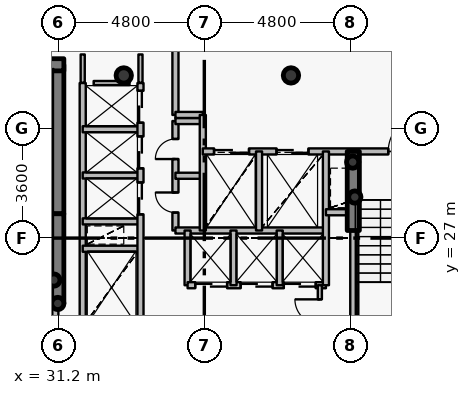
"""IFC4 building model, lengths in metres.
Left out: names, types, materials, properties, quantities, classifications, styles, units other than length and angle.
Written with IfcOpenShell. Run it as: python <this file> out.ifc"""

import sys

from ifc_helpers import new_model, si_unit, direction, frame, frame_2d, origin, origin_2d, place, context, subcontext, project, spatial, rectangle, hollow_circle, extrude, source, transform, mapped, element, fill, save


model = new_model("IFC4")
c1 = context("Model", 3, precision=1e-05, world=origin(), true_north=direction((0.0, 1.0)))
c2 = subcontext(c1, "Body", "Model", "MODEL_VIEW")
j1 = project(units=[si_unit("LENGTHUNIT", "METRE"), si_unit("PLANEANGLEUNIT", "RADIAN")], contexts=[c1])
p1 = place(None, origin())
s1 = spatial("IfcSite", under=j1, at=p1, CompositionType="ELEMENT")
p2 = place(p1, origin())
s2 = spatial("IfcBuilding", under=s1, at=p2, CompositionType="ELEMENT")
p3 = place(p2, origin())
s3 = spatial("IfcBuildingStorey", under=s2, at=p3, CompositionType="ELEMENT", Elevation=0.0)
for number, where, z_axis, x_axis in (
    (1, (38.85, 32.35, 0.0), (0.0, 0.0, 1.0), (1.0, 0.0, 0.0)),
    (2, (33.35, 32.35, 0.0), (0.0, 0.0, 1.0), (1.0, 0.0, 0.0)),
):
    element("IfcColumn", number, at=place(p3, frame(where, z_axis=z_axis, x_axis=x_axis)), inside=s3, PredefinedType="COLUMN", context=c2, shape_type="SweptSolid", body=[
        extrude(hollow_circle(Radius=0.254, WallThickness=0.02, at=origin_2d()), origin(), (0.0, 0.0, 1.0), 6.0),
    ])
p4 = place(p3, frame((31.18, 27.8, 0.0), z_axis=(0.0, 0.0, 1.0), x_axis=(0.0, 1.0, 0.0)))
e3 = element("IfcWall", 3, at=p4, inside=s3, PredefinedType="SHEAR", context=c2, shape_type="SweptSolid", body=[
    extrude(rectangle(XDim=4.9, YDim=0.4, at=frame_2d((2.45, 0.0))), origin(), (0.0, 0.0, 1.0), 6.0),
])
p5 = place(p3, frame((27.28, 32.7, 0.0), z_axis=(0.0, 0.0, 1.0), x_axis=(1.0, 0.0, 0.0)))
e4 = element("IfcWall", 4, at=p5, inside=s3, PredefinedType="SHEAR", context=c2, shape_type="SweptSolid", body=[
    extrude(rectangle(XDim=4.1, YDim=0.4, at=frame_2d((2.05, 0.0))), origin(), (0.0, 0.0, 1.0), 6.0),
])
for number, where, z_axis, x_axis in (
    (5, (31.05, 25.62, 0.0), (0.0, 0.0, 1.0), (1.0, 0.0, 0.0)),
    (6, (31.18, 24.85, 0.0), (0.0, 0.0, 1.0), (1.0, 0.0, 0.0)),
    (7, (40.95, 28.35, 0.0), (0.0, 0.0, 1.0), (1.0, 0.0, 0.0)),
    (8, (40.88, 29.5, 0.0), (0.0, 0.0, 1.0), (1.0, 0.0, 0.0)),
):
    element("IfcColumn", number, at=place(p3, frame(where, z_axis=z_axis, x_axis=x_axis)), inside=s3, PredefinedType="COLUMN", context=c2, shape_type="SweptSolid", body=[
        extrude(hollow_circle(Radius=0.203, WallThickness=0.016, at=origin_2d()), origin(), (0.0, 0.0, 1.0), 6.0),
    ])
p6 = place(p3, frame((31.18, 24.85, 0.0), z_axis=(0.0, 0.0, 1.0), x_axis=(0.0, 1.0, 0.0)))
e9 = element("IfcWall", 9, at=p6, inside=s3, PredefinedType="SHEAR", context=c2, shape_type="SweptSolid", body=[
    extrude(rectangle(XDim=2.95, YDim=0.4, at=frame_2d((1.475, 0.0))), origin(), (0.0, 0.0, 1.0), 5.3),
])
p7 = place(p3, frame((40.9, 27.25, 0.0), z_axis=(0.0, 0.0, 1.0), x_axis=(0.0, 1.0, 0.0)))
e10 = element("IfcWall", 10, at=p7, inside=s3, PredefinedType="SHEAR", context=c2, shape_type="SweptSolid", body=[
    extrude(rectangle(XDim=2.6, YDim=0.4, at=frame_2d((1.3, 0.0))), origin(), (0.0, 0.0, 1.0), 5.3),
])
p8 = place(p3, frame((31.1, 24.1, 0.0), z_axis=(0.0, 0.0, 1.0), x_axis=(0.0, 1.0, 0.0)))
e11 = element("IfcWall", 11, at=p8, inside=s3, PredefinedType="PARTITIONING", context=c2, shape_type="SweptSolid", body=[
    extrude(rectangle(XDim=0.74, YDim=0.2, at=frame_2d((0.37, 0.0))), origin(), (0.0, 0.0, 1.0), 5.7),
])
p9 = place(p3, frame((32.0, 24.1, 0.0), z_axis=(0.0, 0.0, 1.0), x_axis=(0.0, 1.0, 0.0)))
e12 = element("IfcWall", 12, at=p9, inside=s3, PredefinedType="PARTITIONING", context=c2, shape_type="SweptSolid", body=[
    extrude(rectangle(XDim=8.0, YDim=0.2, at=frame_2d((4.0, 0.0))), origin(), (0.0, 0.0, 1.0), 5.7),
])
for number, where, z_axis, x_axis in (
    (13, (32.0, 26.65, 0.0), (0.0, 0.0, 1.0), (1.0, 0.0, 0.0)),
    (14, (32.0, 27.55, 0.0), (0.0, 0.0, 1.0), (1.0, 0.0, 0.0)),
    (15, (32.0, 29.06, 0.0), (0.0, 0.0, 1.0), (1.0, 0.0, 0.0)),
    (16, (32.0, 30.58, 0.0), (0.0, 0.0, 1.0), (1.0, 0.0, 0.0)),
):
    element("IfcWall", number, at=place(p3, frame(where, z_axis=z_axis, x_axis=x_axis)), inside=s3, PredefinedType="PARTITIONING", context=c2, shape_type="SweptSolid", body=[
        extrude(rectangle(XDim=1.9, YDim=0.2, at=frame_2d((0.95, 0.0))), origin(), (0.0, 0.0, 1.0), 5.285),
    ])
p10 = place(p3, frame((33.9, 20.7, 0.0), z_axis=(0.0, 0.0, 1.0), x_axis=(0.0, 1.0, 0.0)))
e17 = element("IfcWall", 17, at=p10, inside=s3, PredefinedType="PARTITIONING", context=c2, shape_type="SweptSolid", body=[
    extrude(rectangle(XDim=11.4, YDim=0.2, at=frame_2d((5.7, 0.0))), origin(), (0.0, 0.0, 1.0), 5.285),
])
p11 = place(p10, frame((7.08, 0.0, 0.0)))
e18 = element("IfcOpeningElement", 18, at=p11, cuts=e17, PredefinedType="OPENING", context=c2, shape_type="SweptSolid", body=[
    extrude(rectangle(XDim=1.05, YDim=2.15, at=origin_2d()), frame((0.525, 0.11, 1.075), z_axis=(0.0, -1.0, 0.0), x_axis=(1.0, 0.0, 0.0)), (0.0, 0.0, 1.0), 0.22),
])
p12 = place(p10, frame((8.595, 0.0, 0.0)))
e19 = element("IfcOpeningElement", 19, at=p12, cuts=e17, PredefinedType="OPENING", context=c2, shape_type="SweptSolid", body=[
    extrude(rectangle(XDim=1.05, YDim=2.15, at=origin_2d()), frame((0.525, 0.11, 1.075), z_axis=(0.0, -1.0, 0.0), x_axis=(1.0, 0.0, 0.0)), (0.0, 0.0, 1.0), 0.22),
])
p13 = place(p10, frame((10.095, 0.0, 0.0)))
e20 = element("IfcOpeningElement", 20, at=p13, cuts=e17, PredefinedType="OPENING", context=c2, shape_type="SweptSolid", body=[
    extrude(rectangle(XDim=1.05, YDim=2.15, at=origin_2d()), frame((0.525, 0.11, 1.075), z_axis=(0.0, -1.0, 0.0), x_axis=(1.0, 0.0, 0.0)), (0.0, 0.0, 1.0), 0.22),
])
p14 = place(p3, frame((35.05, 27.25, 0.0), z_axis=(0.0, 0.0, 1.0), x_axis=(0.0, 1.0, 0.0)))
e21 = element("IfcWall", 21, at=p14, inside=s3, PredefinedType="PARTITIONING", context=c2, shape_type="SweptSolid", body=[
    extrude(rectangle(XDim=3.6, YDim=0.2, at=frame_2d((1.8, 0.0))), origin(), (0.0, 0.0, 1.0), 5.7),
])
p15 = place(p14, frame((0.59, 0.0, 0.0)))
e22 = element("IfcOpeningElement", 22, at=p15, cuts=e21, PredefinedType="OPENING", context=c2, shape_type="SweptSolid", body=[
    extrude(rectangle(XDim=0.66, YDim=2.05, at=origin_2d()), frame((0.33, 0.11, 1.025), z_axis=(0.0, -1.0, 0.0), x_axis=(1.0, 0.0, 0.0)), (0.0, 0.0, 1.0), 0.22),
])
p16 = place(p14, frame((2.35, 0.0, 0.0)))
e23 = element("IfcOpeningElement", 23, at=p16, cuts=e21, PredefinedType="OPENING", context=c2, shape_type="SweptSolid", body=[
    extrude(rectangle(XDim=0.66, YDim=2.05, at=origin_2d()), frame((0.33, 0.11, 1.025), z_axis=(0.0, -1.0, 0.0), x_axis=(1.0, 0.0, 0.0)), (0.0, 0.0, 1.0), 0.22),
])
p17 = place(p3, frame((35.05, 27.25, 0.0), z_axis=(0.0, 0.0, 1.0), x_axis=(1.0, 0.0, 0.0)))
e24 = element("IfcWall", 24, at=p17, inside=s3, PredefinedType="PARTITIONING", context=c2, shape_type="SweptSolid", body=[
    extrude(rectangle(XDim=4.95, YDim=0.2, at=frame_2d((2.475, 0.0))), origin(), (0.0, 0.0, 1.0), 5.285),
])
for number, where, z_axis, x_axis in (
    (25, (35.05, 29.05, 0.0), (0.0, 0.0, 1.0), (1.0, 0.0, 0.0)),
    (26, (35.05, 30.85, 0.0), (0.0, 0.0, 1.0), (1.0, 0.0, 0.0)),
):
    element("IfcWall", number, at=place(p3, frame(where, z_axis=z_axis, x_axis=x_axis)), inside=s3, PredefinedType="PARTITIONING", context=c2, shape_type="SweptSolid", body=[
        extrude(rectangle(XDim=0.9, YDim=0.2, at=frame_2d((0.45, 0.0))), origin(), (0.0, 0.0, 1.0), 5.7),
    ])
p18 = place(p3, frame((35.05, 31.05, 0.0), z_axis=(0.0, 0.0, 1.0), x_axis=(0.0, 1.0, 0.0)))
e27 = element("IfcWall", 27, at=p18, inside=s3, PredefinedType="PARTITIONING", context=c2, shape_type="SweptSolid", body=[
    extrude(rectangle(XDim=2.25, YDim=0.2, at=frame_2d((1.125, 0.0))), origin(), (0.0, 0.0, 1.0), 5.285),
])
p19 = place(p3, frame((35.05, 31.05, 0.0), z_axis=(0.0, 0.0, 1.0), x_axis=(1.0, 0.0, 0.0)))
e28 = element("IfcWall", 28, at=p19, inside=s3, PredefinedType="PARTITIONING", context=c2, shape_type="SweptSolid", body=[
    extrude(rectangle(XDim=0.9, YDim=0.2, at=frame_2d((0.45, 0.0))), origin(), (0.0, 0.0, 1.0), 5.7),
])
p20 = place(p3, frame((35.45, 25.45, 0.0), z_axis=(0.0, 0.0, 1.0), x_axis=(0.0, 1.0, 0.0)))
e29 = element("IfcWall", 29, at=p20, inside=s3, PredefinedType="PARTITIONING", context=c2, shape_type="SweptSolid", body=[
    extrude(rectangle(XDim=1.8, YDim=0.2, at=frame_2d((0.9, 0.0))), origin(), (0.0, 0.0, 1.0), 5.7),
])
p21 = place(p3, frame((35.45, 25.45, 0.0), z_axis=(0.0, 0.0, 1.0), x_axis=(1.0, 0.0, 0.0)))
e30 = element("IfcWall", 30, at=p21, inside=s3, PredefinedType="PARTITIONING", context=c2, shape_type="SweptSolid", body=[
    extrude(rectangle(XDim=4.55, YDim=0.2, at=frame_2d((2.275, 0.0))), origin(), (0.0, 0.0, 1.0), 5.285),
])
p22 = place(p21, frame((0.25, 0.0, 0.0)))
e31 = element("IfcOpeningElement", 31, at=p22, cuts=e30, PredefinedType="OPENING", context=c2, shape_type="SweptSolid", body=[
    extrude(rectangle(XDim=1.05, YDim=2.15, at=origin_2d()), frame((0.525, 0.11, 1.075), z_axis=(0.0, -1.0, 0.0), x_axis=(1.0, 0.0, 0.0)), (0.0, 0.0, 1.0), 0.22),
])
p23 = place(p21, frame((1.745, 0.0, 0.0)))
e32 = element("IfcOpeningElement", 32, at=p23, cuts=e30, PredefinedType="OPENING", context=c2, shape_type="SweptSolid", body=[
    extrude(rectangle(XDim=1.05, YDim=2.15, at=origin_2d()), frame((0.525, 0.11, 1.075), z_axis=(0.0, -1.0, 0.0), x_axis=(1.0, 0.0, 0.0)), (0.0, 0.0, 1.0), 0.22),
])
p24 = place(p21, frame((3.165, 0.0, 0.0)))
e33 = element("IfcOpeningElement", 33, at=p24, cuts=e30, PredefinedType="OPENING", context=c2, shape_type="SweptSolid", body=[
    extrude(rectangle(XDim=1.05, YDim=2.15, at=origin_2d()), frame((0.525, 0.11, 1.075), z_axis=(0.0, -1.0, 0.0), x_axis=(1.0, 0.0, 0.0)), (0.0, 0.0, 1.0), 0.22),
])
p25 = place(p3, frame((35.95, 27.25, 0.0), z_axis=(0.0, 0.0, 1.0), x_axis=(0.0, 1.0, 0.0)))
e34 = element("IfcWall", 34, at=p25, inside=s3, PredefinedType="PARTITIONING", context=c2, shape_type="SweptSolid", body=[
    extrude(rectangle(XDim=3.8, YDim=0.2, at=frame_2d((1.9, 0.0))), origin(), (0.0, 0.0, 1.0), 5.7),
])
p26 = place(p3, frame((35.95, 29.85, 0.0), z_axis=(0.0, 0.0, 1.0), x_axis=(1.0, 0.0, 0.0)))
e35 = element("IfcWall", 35, at=p26, inside=s3, PredefinedType="PARTITIONING", context=c2, shape_type="SweptSolid", body=[
    extrude(rectangle(XDim=8.49, YDim=0.2, at=frame_2d((4.245, 0.0))), origin(), (0.0, 0.0, 1.0), 5.285),
])
p27 = place(p26, frame((6.1, 0.0, 0.0)))
e36 = element("IfcOpeningElement", 36, at=p27, cuts=e35, PredefinedType="OPENING", context=c2, shape_type="SweptSolid", body=[
    extrude(rectangle(XDim=1.2, YDim=2.15, at=origin_2d()), frame((0.6, 0.11, 1.075), z_axis=(0.0, -1.0, 0.0), x_axis=(1.0, 0.0, 0.0)), (0.0, 0.0, 1.0), 0.22),
])
p28 = place(p26, frame((0.37, 0.0, 0.0)))
e37 = element("IfcOpeningElement", 37, at=p28, cuts=e35, PredefinedType="OPENING", context=c2, shape_type="SweptSolid", body=[
    extrude(rectangle(XDim=1.15, YDim=2.15, at=origin_2d()), frame((0.575, 0.11, 1.075), z_axis=(0.0, -1.0, 0.0), x_axis=(1.0, 0.0, 0.0)), (0.0, 0.0, 1.0), 0.22),
])
p29 = place(p26, frame((2.425, 0.0, 0.0)))
e38 = element("IfcOpeningElement", 38, at=p29, cuts=e35, PredefinedType="OPENING", context=c2, shape_type="SweptSolid", body=[
    extrude(rectangle(XDim=1.05, YDim=2.15, at=origin_2d()), frame((0.525, 0.11, 1.075), z_axis=(0.0, -1.0, 0.0), x_axis=(1.0, 0.0, 0.0)), (0.0, 0.0, 1.0), 0.22),
])
p30 = place(p3, frame((36.96, 25.45, 0.0), z_axis=(0.0, 0.0, 1.0), x_axis=(0.0, 1.0, 0.0)))
e39 = element("IfcWall", 39, at=p30, inside=s3, PredefinedType="PARTITIONING", context=c2, shape_type="SweptSolid", body=[
    extrude(rectangle(XDim=1.8, YDim=0.2, at=frame_2d((0.9, 0.0))), origin(), (0.0, 0.0, 1.0), 5.7),
])
p31 = place(p3, frame((37.8, 27.25, 0.0), z_axis=(0.0, 0.0, 1.0), x_axis=(0.0, 1.0, 0.0)))
e40 = element("IfcWall", 40, at=p31, inside=s3, PredefinedType="PARTITIONING", context=c2, shape_type="SweptSolid", body=[
    extrude(rectangle(XDim=2.6, YDim=0.2, at=frame_2d((1.3, 0.0))), origin(), (0.0, 0.0, 1.0), 5.7),
])
p32 = place(p3, frame((38.48, 25.45, 0.0), z_axis=(0.0, 0.0, 1.0), x_axis=(0.0, 1.0, 0.0)))
e41 = element("IfcWall", 41, at=p32, inside=s3, PredefinedType="PARTITIONING", context=c2, shape_type="SweptSolid", body=[
    extrude(rectangle(XDim=1.8, YDim=0.2, at=frame_2d((0.9, 0.0))), origin(), (0.0, 0.0, 1.0), 5.7),
])
p33 = place(p3, frame((39.8, 23.7, 0.0), z_axis=(0.0, 0.0, 1.0), x_axis=(0.0, 1.0, 0.0)))
e42 = element("IfcWall", 42, at=p33, inside=s3, PredefinedType="PARTITIONING", context=c2, shape_type="SweptSolid", body=[
    extrude(rectangle(XDim=1.75, YDim=0.135, at=frame_2d((0.875, 0.0))), origin(), (0.0, 0.0, 1.0), 5.7),
])
p34 = place(p33, frame((0.465, 0.0, 0.0)))
e43 = element("IfcOpeningElement", 43, at=p34, cuts=e42, PredefinedType="OPENING", context=c2, shape_type="SweptSolid", body=[
    extrude(rectangle(XDim=0.82, YDim=2.1, at=origin_2d()), frame((0.41, 0.078, 1.05), z_axis=(0.0, -1.0, 0.0), x_axis=(1.0, 0.0, 0.0)), (0.0, 0.0, 1.0), 0.155),
])
p35 = place(p3, frame((40.0, 25.45, 0.0), z_axis=(0.0, 0.0, 1.0), x_axis=(0.0, 1.0, 0.0)))
e44 = element("IfcWall", 44, at=p35, inside=s3, PredefinedType="PARTITIONING", context=c2, shape_type="SweptSolid", body=[
    extrude(rectangle(XDim=4.4, YDim=0.2, at=frame_2d((2.2, 0.0))), origin(), (0.0, 0.0, 1.0), 5.7),
])
p36 = place(p3, frame((40.0, 27.85, 0.0), z_axis=(0.0, 0.0, 1.0), x_axis=(1.0, 0.0, 0.0)))
e45 = element("IfcWall", 45, at=p36, inside=s3, PredefinedType="PARTITIONING", context=c2, shape_type="SweptSolid", body=[
    extrude(rectangle(XDim=0.9, YDim=0.2, at=frame_2d((0.45, 0.0))), origin(), (0.0, 0.0, 1.0), 5.7),
])
p37 = place(p3, frame((40.9, 21.33, 0.0), z_axis=(0.0, 0.0, 1.0), x_axis=(0.0, 1.0, 0.0)))
e46 = element("IfcWall", 46, at=p37, inside=s3, PredefinedType="PARTITIONING", context=c2, shape_type="SweptSolid", body=[
    extrude(rectangle(XDim=5.91, YDim=0.2, at=frame_2d((2.955, 0.0))), origin(), (0.0, 0.0, 1.0), 5.235),
])
p38 = place(p3, frame((32.36, 32.1, 0.0), z_axis=(0.0, 0.0, 1.0), x_axis=(1.0, 0.0, 0.0)))
e47 = element("IfcWall", 47, at=p38, inside=s3, PredefinedType="PARTITIONING", context=c2, shape_type="SweptSolid", body=[
    extrude(rectangle(XDim=1.18, YDim=0.135, at=frame_2d((0.59, 0.0))), origin(), (0.0, 0.0, 1.0), 5.285),
])
p39 = place(p3, frame((32.0, 33.04, 0.0), z_axis=(0.0, 0.0, 1.0), x_axis=(0.0, -1.0, 0.0)))
e48 = element("IfcWall", 48, at=p39, inside=s3, PredefinedType="PARTITIONING", context=c2, shape_type="SweptSolid", body=[
    extrude(rectangle(XDim=0.93, YDim=0.135, at=frame_2d((0.465, 0.0))), origin(), (0.0, 0.0, 1.0), 5.235),
])
p40 = place(p3, frame((33.9, 32.11, 0.0), z_axis=(0.0, 0.0, 1.0), x_axis=(0.0, 1.0, 0.0)))
e49 = element("IfcWall", 49, at=p40, inside=s3, PredefinedType="PARTITIONING", context=c2, shape_type="SweptSolid", body=[
    extrude(rectangle(XDim=0.93, YDim=0.135, at=frame_2d((0.465, 0.0))), origin(), (0.0, 0.0, 1.0), 5.285),
])
m1 = source(origin(), c2, "Body", "SweptSolid", [
    extrude(rectangle(XDim=1.2, YDim=2.15, at=origin_2d()), frame((0.6, 0.025, 1.075), z_axis=(0.0, -1.0, 0.0), x_axis=(1.0, 0.0, 0.0)), (0.0, 0.0, 1.0), 0.05),
])
p41 = place(p27, origin())
e50 = element("IfcDoor", 50, at=p41, inside=s3, OperationType="SINGLE_SWING_RIGHT", PredefinedType="DOOR", context=c2, shape_type="MappedRepresentation", body=[
    mapped(m1, transform((0.0, 0.0, 0.0), x_axis=(1.0, 0.0, 0.0), y_axis=(0.0, 1.0, 0.0), z_axis=(0.0, 0.0, 1.0), scale=1.0)),
])
fill(e36, e50)
m2 = source(origin(), c2, "Body", "SweptSolid", [
    extrude(rectangle(XDim=1.15, YDim=2.15, at=origin_2d()), frame((0.575, 0.025, 1.075), z_axis=(0.0, -1.0, 0.0), x_axis=(1.0, 0.0, 0.0)), (0.0, 0.0, 1.0), 0.05),
])
p42 = place(p28, origin())
e51 = element("IfcDoor", 51, at=p42, inside=s3, OperationType="DOUBLE_DOOR_SLIDING", PredefinedType="USERDEFINED", context=c2, shape_type="MappedRepresentation", body=[
    mapped(m2, transform((0.0, 0.0, 0.0), x_axis=(1.0, 0.0, 0.0), y_axis=(0.0, 1.0, 0.0), z_axis=(0.0, 0.0, 1.0), scale=1.0)),
])
fill(e37, e51)
m3 = source(origin(), c2, "Body", "SweptSolid", [
    extrude(rectangle(XDim=1.05, YDim=2.15, at=origin_2d()), frame((0.525, 0.025, 1.075), z_axis=(0.0, -1.0, 0.0), x_axis=(1.0, 0.0, 0.0)), (0.0, 0.0, 1.0), 0.05),
])
p43 = place(p29, origin())
e52 = element("IfcDoor", 52, at=p43, inside=s3, OperationType="DOUBLE_DOOR_SLIDING", PredefinedType="USERDEFINED", context=c2, shape_type="MappedRepresentation", body=[
    mapped(m3, transform((0.0, 0.0, 0.0), x_axis=(1.0, 0.0, 0.0), y_axis=(0.0, 1.0, 0.0), z_axis=(0.0, 0.0, 1.0), scale=1.0)),
])
fill(e38, e52)
p44 = place(p11, origin())
e53 = element("IfcDoor", 53, at=p44, inside=s3, OperationType="DOUBLE_DOOR_SLIDING", PredefinedType="USERDEFINED", context=c2, shape_type="MappedRepresentation", body=[
    mapped(m3, transform((0.0, 0.0, 0.0), x_axis=(1.0, 0.0, 0.0), y_axis=(0.0, 1.0, 0.0), z_axis=(0.0, 0.0, 1.0), scale=1.0)),
])
fill(e18, e53)
p45 = place(p12, origin())
e54 = element("IfcDoor", 54, at=p45, inside=s3, OperationType="DOUBLE_DOOR_SLIDING", PredefinedType="USERDEFINED", context=c2, shape_type="MappedRepresentation", body=[
    mapped(m3, transform((0.0, 0.0, 0.0), x_axis=(1.0, 0.0, 0.0), y_axis=(0.0, 1.0, 0.0), z_axis=(0.0, 0.0, 1.0), scale=1.0)),
])
fill(e19, e54)
p46 = place(p13, origin())
e55 = element("IfcDoor", 55, at=p46, inside=s3, OperationType="DOUBLE_DOOR_SLIDING", PredefinedType="USERDEFINED", context=c2, shape_type="MappedRepresentation", body=[
    mapped(m3, transform((0.0, 0.0, 0.0), x_axis=(1.0, 0.0, 0.0), y_axis=(0.0, 1.0, 0.0), z_axis=(0.0, 0.0, 1.0), scale=1.0)),
])
fill(e20, e55)
p47 = place(p22, origin())
e56 = element("IfcDoor", 56, at=p47, inside=s3, OperationType="DOUBLE_DOOR_SLIDING", PredefinedType="USERDEFINED", context=c2, shape_type="MappedRepresentation", body=[
    mapped(m3, transform((0.0, 0.0, 0.0), x_axis=(1.0, 0.0, 0.0), y_axis=(0.0, 1.0, 0.0), z_axis=(0.0, 0.0, 1.0), scale=1.0)),
])
fill(e31, e56)
p48 = place(p23, origin())
e57 = element("IfcDoor", 57, at=p48, inside=s3, OperationType="DOUBLE_DOOR_SLIDING", PredefinedType="USERDEFINED", context=c2, shape_type="MappedRepresentation", body=[
    mapped(m3, transform((0.0, 0.0, 0.0), x_axis=(1.0, 0.0, 0.0), y_axis=(0.0, 1.0, 0.0), z_axis=(0.0, 0.0, 1.0), scale=1.0)),
])
fill(e32, e57)
p49 = place(p24, origin())
e58 = element("IfcDoor", 58, at=p49, inside=s3, OperationType="DOUBLE_DOOR_SLIDING", PredefinedType="USERDEFINED", context=c2, shape_type="MappedRepresentation", body=[
    mapped(m3, transform((0.0, 0.0, 0.0), x_axis=(1.0, 0.0, 0.0), y_axis=(0.0, 1.0, 0.0), z_axis=(0.0, 0.0, 1.0), scale=1.0)),
])
fill(e33, e58)
m4 = source(origin(), c2, "Body", "SweptSolid", [
    extrude(rectangle(XDim=0.66, YDim=2.05, at=origin_2d()), frame((0.33, 0.025, 1.025), z_axis=(0.0, -1.0, 0.0), x_axis=(1.0, 0.0, 0.0)), (0.0, 0.0, 1.0), 0.05),
])
p50 = place(p15, origin())
e59 = element("IfcDoor", 59, at=p50, inside=s3, OperationType="SINGLE_SWING_RIGHT", PredefinedType="USERDEFINED", context=c2, shape_type="MappedRepresentation", body=[
    mapped(m4, transform((0.0, 0.0, 0.0), x_axis=(1.0, 0.0, 0.0), y_axis=(0.0, 1.0, 0.0), z_axis=(0.0, 0.0, 1.0), scale=1.0)),
])
fill(e22, e59)
p51 = place(p16, origin())
e60 = element("IfcDoor", 60, at=p51, inside=s3, OperationType="SINGLE_SWING_LEFT", PredefinedType="USERDEFINED", context=c2, shape_type="MappedRepresentation", body=[
    mapped(m4, transform((0.0, 0.0, 0.0), x_axis=(1.0, 0.0, 0.0), y_axis=(0.0, 1.0, 0.0), z_axis=(0.0, 0.0, 1.0), scale=1.0)),
])
fill(e23, e60)
m5 = source(origin(), c2, "Body", "SweptSolid", [
    extrude(rectangle(XDim=0.82, YDim=2.1, at=origin_2d()), frame((0.41, 0.025, 1.05), z_axis=(0.0, -1.0, 0.0), x_axis=(1.0, 0.0, 0.0)), (0.0, 0.0, 1.0), 0.05),
])
p52 = place(p34, origin())
e61 = element("IfcDoor", 61, at=p52, inside=s3, OperationType="SINGLE_SWING_RIGHT", PredefinedType="DOOR", context=c2, shape_type="MappedRepresentation", body=[
    mapped(m5, transform((0.0, 0.0, 0.0), x_axis=(1.0, 0.0, 0.0), y_axis=(0.0, 1.0, 0.0), z_axis=(0.0, 0.0, 1.0), scale=1.0)),
])
fill(e43, e61)
save(model, sys.argv[1])
